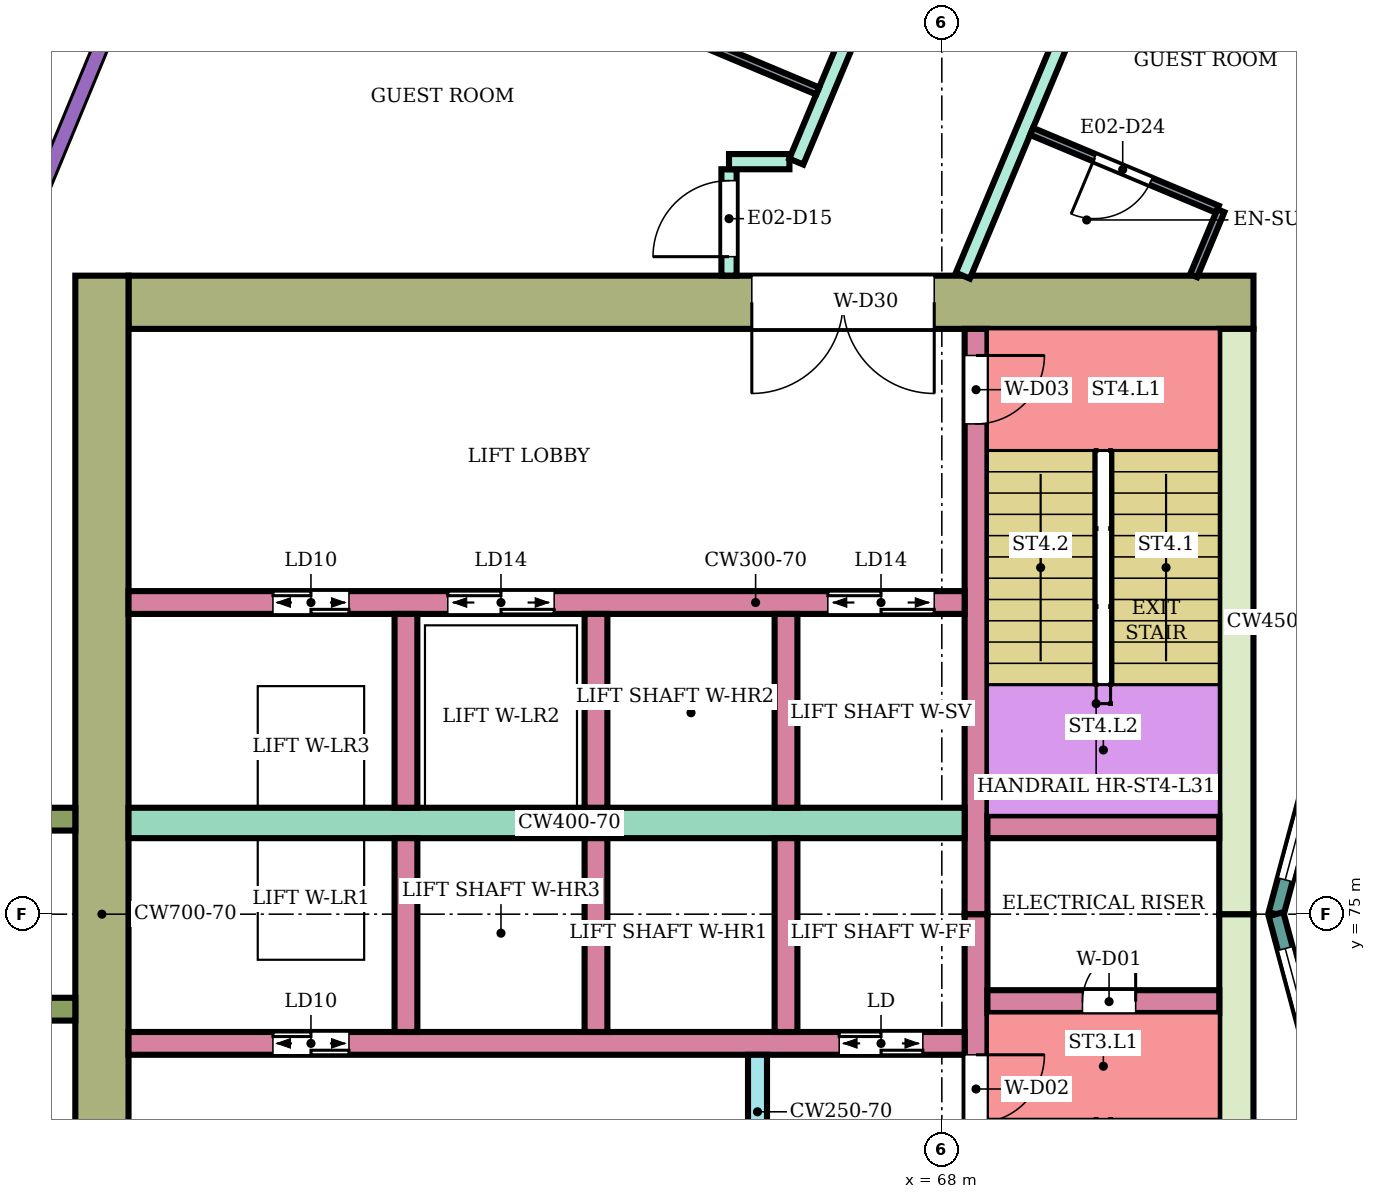
"""IFC4 building model, lengths in metres.
Left out: names, types, materials, properties, quantities, classifications, styles, units other than length and angle.
Written with IfcOpenShell. Run it as: python <this file> out.ifc"""

import sys

from ifc_helpers import new_model, si_unit, direction, frame, frame_2d, origin, place, context, subcontext, project, spatial, rectangle, extrude, element, fill, save


model = new_model("IFC4")
c1 = context("Model", 3, precision=1e-05, world=origin(), true_north=direction((0.0, 1.0)))
c2 = subcontext(c1, "Body", "Model", "MODEL_VIEW")
j1 = project(units=[si_unit("LENGTHUNIT", "METRE"), si_unit("PLANEANGLEUNIT", "RADIAN")], contexts=[c1])
p1 = place(None, origin())
s1 = spatial("IfcSite", under=j1, at=p1, CompositionType="ELEMENT")
p2 = place(p1, origin())
s2 = spatial("IfcBuilding", under=s1, at=p2, CompositionType="ELEMENT")
p3 = place(p2, frame((0.0, 0.0, 134.1)))
s3 = spatial("IfcBuildingStorey", under=s2, at=p3, CompositionType="ELEMENT", Elevation=134.1)
p4 = place(p3, frame((72.1, 83.05, 0.0), z_axis=(0.0, 0.0, 1.0), x_axis=(-1.0, 0.0, 0.0)))
e1 = element("IfcWall", 1, at=p4, inside=s3, PredefinedType="SHEAR", context=c2, shape_type="SweptSolid", body=[
    extrude(rectangle(XDim=14.8, YDim=0.7, at=frame_2d((7.4, 0.0))), origin(), (0.0, 0.0, 1.0), 3.58),
])
p5 = place(p4, frame((4.2, 0.0, 0.0)))
e2 = element("IfcOpeningElement", 2, at=p5, cuts=e1, PredefinedType="OPENING", context=c2, shape_type="SweptSolid", body=[
    extrude(rectangle(XDim=2.4, YDim=2.4, at=frame_2d((1.2, 1.2))), frame((0.0, 0.36, 0.0), z_axis=(0.0, -1.0, 0.0), x_axis=(1.0, 0.0, 0.0)), (0.0, 0.0, 1.0), 0.72),
])
for number, where, z_axis, x_axis in (
    (3, (71.875, 75.0, 0.0), (0.0, 0.0, 1.0), (0.0, -1.0, 0.0)),
    (4, (71.875, 82.7, 0.0), (0.0, 0.0, 1.0), (0.0, -1.0, 0.0)),
):
    element("IfcWall", number, at=place(p3, frame(where, z_axis=z_axis, x_axis=x_axis)), inside=s3, PredefinedType="SHEAR", context=c2, shape_type="SweptSolid", body=[
        extrude(rectangle(XDim=7.7, YDim=0.45, at=frame_2d((3.85, 0.0))), origin(), (0.0, 0.0, 1.0), 3.58),
    ])
p6 = place(p3, frame((56.95, 83.4, 0.0), z_axis=(0.0, 0.0, 1.0), x_axis=(0.0, -1.0, 0.0)))
e5 = element("IfcWall", 5, at=p6, inside=s3, PredefinedType="SHEAR", context=c2, shape_type="SweptSolid", body=[
    extrude(rectangle(XDim=16.8, YDim=0.7, at=frame_2d((8.4, 0.0))), origin(), (0.0, 0.0, 1.0), 3.58),
])
p7 = place(p3, frame((68.45, 75.0, 0.0), z_axis=(0.0, 0.0, 1.0), x_axis=(0.0, -1.0, 0.0)))
e6 = element("IfcWall", 6, at=p7, inside=s3, PredefinedType="SHEAR", context=c2, shape_type="SweptSolid", body=[
    extrude(rectangle(XDim=7.7, YDim=0.3, at=frame_2d((3.85, 0.0))), origin(), (0.0, 0.0, 1.0), 3.58),
])
p8 = place(p7, frame((1.85, 0.0, 0.0)))
e7 = element("IfcOpeningElement", 7, at=p8, cuts=e6, PredefinedType="OPENING", context=c2, shape_type="SweptSolid", body=[
    extrude(rectangle(XDim=0.9, YDim=2.1, at=frame_2d((0.45, 1.05))), frame((0.0, 0.16, 0.0), z_axis=(0.0, -1.0, 0.0), x_axis=(1.0, 0.0, 0.0)), (0.0, 0.0, 1.0), 0.32),
])
p9 = place(p3, frame((68.45, 82.7, 0.0), z_axis=(0.0, 0.0, 1.0), x_axis=(0.0, -1.0, 0.0)))
e8 = element("IfcWall", 8, at=p9, inside=s3, PredefinedType="SHEAR", context=c2, shape_type="SweptSolid", body=[
    extrude(rectangle(XDim=7.7, YDim=0.3, at=frame_2d((3.85, 0.0))), origin(), (0.0, 0.0, 1.0), 3.58),
])
p10 = place(p9, frame((0.35, 0.0, 0.0)))
e9 = element("IfcOpeningElement", 9, at=p10, cuts=e8, PredefinedType="OPENING", context=c2, shape_type="SweptSolid", body=[
    extrude(rectangle(XDim=0.9, YDim=2.1, at=frame_2d((0.45, 1.05))), frame((0.0, 0.16, 0.0), z_axis=(0.0, -1.0, 0.0), x_axis=(1.0, 0.0, 0.0)), (0.0, 0.0, 1.0), 0.32),
])
p11 = place(p3, frame((71.65, 73.85, 0.0), z_axis=(0.0, 0.0, 1.0), x_axis=(-1.0, 0.0, 0.0)))
e10 = element("IfcWall", 10, at=p11, inside=s3, PredefinedType="SHEAR", context=c2, shape_type="SweptSolid", body=[
    extrude(rectangle(XDim=3.05, YDim=0.3, at=frame_2d((1.525, 0.0))), origin(), (0.0, 0.0, 1.0), 3.58),
])
p12 = place(p11, frame((1.1, 0.0, 0.0)))
e11 = element("IfcOpeningElement", 11, at=p12, cuts=e10, PredefinedType="OPENING", context=c2, shape_type="SweptSolid", body=[
    extrude(rectangle(XDim=0.7, YDim=2.0, at=frame_2d((0.35, 1.0))), frame((0.0, 0.16, 0.0), z_axis=(0.0, -1.0, 0.0), x_axis=(1.0, 0.0, 0.0)), (0.0, 0.0, 1.0), 0.32),
])
p13 = place(p3, frame((71.65, 76.15, 0.0), z_axis=(0.0, 0.0, 1.0), x_axis=(-1.0, 0.0, 0.0)))
e12 = element("IfcWall", 12, at=p13, inside=s3, PredefinedType="SHEAR", context=c2, shape_type="SweptSolid", body=[
    extrude(rectangle(XDim=3.05, YDim=0.3, at=frame_2d((1.525, 0.0))), origin(), (0.0, 0.0, 1.0), 3.58),
])
p14 = place(p3, frame((68.3, 73.3, 0.0), z_axis=(0.0, 0.0, 1.0), x_axis=(-1.0, 0.0, 0.0)))
e13 = element("IfcWall", 13, at=p14, inside=s3, PredefinedType="SHEAR", context=c2, shape_type="SweptSolid", body=[
    extrude(rectangle(XDim=11.0, YDim=0.3, at=frame_2d((5.5, 0.0))), origin(), (0.0, 0.0, 1.0), 3.58),
])
p15 = place(p14, frame((0.55, 0.0, 0.0)))
e14 = element("IfcOpeningElement", 14, at=p15, cuts=e13, PredefinedType="OPENING", context=c2, shape_type="SweptSolid", body=[
    extrude(rectangle(XDim=1.1, YDim=2.1, at=frame_2d((0.55, 1.05))), frame((0.0, 0.16, 0.0), z_axis=(0.0, -1.0, 0.0), x_axis=(1.0, 0.0, 0.0)), (0.0, 0.0, 1.0), 0.32),
])
p16 = place(p14, frame((8.1, 0.0, 0.0)))
e15 = element("IfcOpeningElement", 15, at=p16, cuts=e13, PredefinedType="OPENING", context=c2, shape_type="SweptSolid", body=[
    extrude(rectangle(XDim=1.0, YDim=2.1, at=frame_2d((0.5, 1.05))), frame((0.0, 0.16, 0.0), z_axis=(0.0, -1.0, 0.0), x_axis=(1.0, 0.0, 0.0)), (0.0, 0.0, 1.0), 0.32),
])
p17 = place(p3, frame((68.3, 76.2, 0.0), z_axis=(0.0, 0.0, 1.0), x_axis=(-1.0, 0.0, 0.0)))
e16 = element("IfcWall", 16, at=p17, inside=s3, PredefinedType="SHEAR", context=c2, shape_type="SweptSolid", body=[
    extrude(rectangle(XDim=11.0, YDim=0.4, at=frame_2d((5.5, 0.0))), origin(), (0.0, 0.0, 1.0), 3.58),
])
p18 = place(p3, frame((68.3, 79.1, 0.0), z_axis=(0.0, 0.0, 1.0), x_axis=(-1.0, 0.0, 0.0)))
e17 = element("IfcWall", 17, at=p18, inside=s3, PredefinedType="SHEAR", context=c2, shape_type="SweptSolid", body=[
    extrude(rectangle(XDim=11.0, YDim=0.3, at=frame_2d((5.5, 0.0))), origin(), (0.0, 0.0, 1.0), 3.58),
])
p19 = place(p18, frame((0.4, 0.0, 0.0)))
e18 = element("IfcOpeningElement", 18, at=p19, cuts=e17, PredefinedType="OPENING", context=c2, shape_type="SweptSolid", body=[
    extrude(rectangle(XDim=1.4, YDim=2.1, at=frame_2d((0.7, 1.05))), frame((0.0, 0.16, 0.0), z_axis=(0.0, -1.0, 0.0), x_axis=(1.0, 0.0, 0.0)), (0.0, 0.0, 1.0), 0.32),
])
p20 = place(p18, frame((5.4, 0.0, 0.0)))
e19 = element("IfcOpeningElement", 19, at=p20, cuts=e17, PredefinedType="OPENING", context=c2, shape_type="SweptSolid", body=[
    extrude(rectangle(XDim=1.4, YDim=2.1, at=frame_2d((0.7, 1.05))), frame((0.0, 0.16, 0.0), z_axis=(0.0, -1.0, 0.0), x_axis=(1.0, 0.0, 0.0)), (0.0, 0.0, 1.0), 0.32),
])
p21 = place(p18, frame((8.1, 0.0, 0.0)))
e20 = element("IfcOpeningElement", 20, at=p21, cuts=e17, PredefinedType="OPENING", context=c2, shape_type="SweptSolid", body=[
    extrude(rectangle(XDim=1.0, YDim=2.1, at=frame_2d((0.5, 1.05))), frame((0.0, 0.16, 0.0), z_axis=(0.0, -1.0, 0.0), x_axis=(1.0, 0.0, 0.0)), (0.0, 0.0, 1.0), 0.32),
])
for number, where, z_axis, x_axis in (
    (21, (65.95, 76.0, 0.0), (0.0, 0.0, 1.0), (0.0, -1.0, 0.0)),
    (22, (63.45, 76.0, 0.0), (0.0, 0.0, 1.0), (0.0, -1.0, 0.0)),
    (23, (60.95, 76.0, 0.0), (0.0, 0.0, 1.0), (0.0, -1.0, 0.0)),
    (24, (65.95, 78.95, 0.0), (0.0, 0.0, 1.0), (0.0, -1.0, 0.0)),
    (25, (63.45, 78.95, 0.0), (0.0, 0.0, 1.0), (0.0, -1.0, 0.0)),
    (26, (60.95, 78.95, 0.0), (0.0, 0.0, 1.0), (0.0, -1.0, 0.0)),
):
    element("IfcWall", number, at=place(p3, frame(where, z_axis=z_axis, x_axis=x_axis)), inside=s3, PredefinedType="SHEAR", context=c2, shape_type="SweptSolid", body=[
        extrude(rectangle(XDim=2.55, YDim=0.3, at=frame_2d((1.275, 0.0))), origin(), (0.0, 0.0, 1.0), 3.58),
    ])
p22 = place(p3, frame((65.575, 73.15, 0.0), z_axis=(0.0, 0.0, 1.0), x_axis=(0.0, -1.0, 0.0)))
e27 = element("IfcWall", 27, at=p22, inside=s3, PredefinedType="SHEAR", context=c2, shape_type="SweptSolid", body=[
    extrude(rectangle(XDim=1.5, YDim=0.25, at=frame_2d((0.75, 0.0))), origin(), (0.0, 0.0, 1.0), 3.58),
])
for number, where, z_axis, x_axis in (
    (28, (56.6, 76.25, 0.0), (0.0, 0.0, 1.0), (-1.0, 0.0, 0.0)),
    (29, (56.6, 73.75, 0.0), (0.0, 0.0, 1.0), (-1.0, 0.0, 0.0)),
):
    element("IfcWall", number, at=place(p3, frame(where, z_axis=z_axis, x_axis=x_axis)), inside=s3, PredefinedType="NOTDEFINED", context=c2, shape_type="SweptSolid", body=[
        extrude(rectangle(XDim=2.416, YDim=0.3, at=frame_2d((1.208, 0.0))), origin(), (0.0, 0.0, 1.0), 3.9),
    ])
p23 = place(p3, frame((73.415, 78.802, 0.0), z_axis=(0.0, 0.0, 1.0), x_axis=(-0.258789828301, -0.965933654434, 0.0)))
e30 = element("IfcWall", 30, at=p23, inside=s3, PredefinedType="NOTDEFINED", context=c2, shape_type="SweptSolid", body=[
    extrude(rectangle(XDim=3.936, YDim=0.2, at=frame_2d((1.968, 0.0))), origin(), (0.0, 0.0, 1.0), 3.9),
])
p24 = place(p23, frame((0.468, 0.0, 0.9)))
e31 = element("IfcOpeningElement", 31, at=p24, cuts=e30, PredefinedType="OPENING", context=c2, shape_type="SweptSolid", body=[
    extrude(rectangle(XDim=3.0, YDim=2.3, at=frame_2d((1.5, 1.15))), frame((0.0, 0.11, 0.0), z_axis=(0.0, -1.0, 0.0), x_axis=(1.0, 0.0, 0.0)), (0.0, 0.0, 1.0), 0.22),
])
p25 = place(p3, frame((72.396, 75.0, 0.0), z_axis=(0.0, 0.0, 1.0), x_axis=(0.258789828301, -0.965933654434, 0.0)))
e32 = element("IfcWall", 32, at=p25, inside=s3, PredefinedType="NOTDEFINED", context=c2, shape_type="SweptSolid", body=[
    extrude(rectangle(XDim=3.936, YDim=0.2, at=frame_2d((1.968, 0.0))), origin(), (0.0, 0.0, 1.0), 3.9),
])
p26 = place(p25, frame((0.468, 0.0, 0.9)))
e33 = element("IfcOpeningElement", 33, at=p26, cuts=e32, PredefinedType="OPENING", context=c2, shape_type="SweptSolid", body=[
    extrude(rectangle(XDim=3.0, YDim=2.3, at=frame_2d((1.5, 1.15))), frame((0.0, 0.11, 0.0), z_axis=(0.0, -1.0, 0.0), x_axis=(1.0, 0.0, 0.0)), (0.0, 0.0, 1.0), 0.22),
])
p27 = place(p3, frame((65.2, 83.401, 0.0), z_axis=(0.0, 0.0, 1.0), x_axis=(0.0, 1.0, 0.0)))
e34 = element("IfcWall", 34, at=p27, inside=s3, PredefinedType="PARTITIONING", context=c2, shape_type="SweptSolid", body=[
    extrude(rectangle(XDim=1.399, YDim=0.2, at=frame_2d((0.7, 0.0))), origin(), (0.0, 0.0, 1.0), 3.45),
])
p28 = place(p27, frame((0.249, 0.0, 0.0)))
e35 = element("IfcOpeningElement", 35, at=p28, cuts=e34, PredefinedType="OPENING", context=c2, shape_type="SweptSolid", body=[
    extrude(rectangle(XDim=1.0, YDim=2.1, at=frame_2d((0.5, 1.05))), frame((0.0, 0.11, 0.0), z_axis=(0.0, -1.0, 0.0), x_axis=(1.0, 0.0, 0.0)), (0.0, 0.0, 1.0), 0.22),
])
p29 = place(p3, frame((65.2, 84.9, 0.0), z_axis=(0.0, 0.0, 1.0), x_axis=(1.0, 0.0, 0.0)))
e36 = element("IfcWall", 36, at=p29, inside=s3, PredefinedType="PARTITIONING", context=c2, shape_type="SweptSolid", body=[
    extrude(rectangle(XDim=0.795, YDim=0.2, at=frame_2d((0.397, 0.0))), origin(), (0.0, 0.0, 1.0), 3.45),
])
p30 = place(p3, frame((66.085, 84.9, 0.0), z_axis=(0.0, 0.0, 1.0), x_axis=(0.386617151403, 0.922240303956, 0.0)))
e37 = element("IfcWall", 37, at=p30, inside=s3, PredefinedType="PARTITIONING", context=c2, shape_type="SweptSolid", body=[
    extrude(rectangle(XDim=8.5, YDim=0.2, at=frame_2d((4.25, 0.0))), origin(), (0.0, 0.0, 1.0), 3.45),
])
p31 = place(p30, frame((3.748, 0.0, 0.0)))
e38 = element("IfcOpeningElement", 38, at=p31, cuts=e37, PredefinedType="OPENING", context=c2, shape_type="SweptSolid", body=[
    extrude(rectangle(XDim=1.0, YDim=2.1, at=frame_2d((0.5, 1.05))), frame((0.0, 0.11, 0.0), z_axis=(0.0, -1.0, 0.0), x_axis=(1.0, 0.0, 0.0)), (0.0, 0.0, 1.0), 0.22),
])
p32 = place(p3, frame((68.277, 83.4, 0.0), z_axis=(0.0, 0.0, 1.0), x_axis=(0.386454861164, 0.922308321703, 0.0)))
e39 = element("IfcWall", 39, at=p32, inside=s3, PredefinedType="PARTITIONING", context=c2, shape_type="SweptSolid", body=[
    extrude(rectangle(XDim=7.762, YDim=0.2, at=frame_2d((3.881, 0.0))), origin(), (0.0, 0.0, 1.0), 3.45),
])
p33 = place(p32, frame((5.351, 0.0, 0.0)))
e40 = element("IfcOpeningElement", 40, at=p33, cuts=e39, PredefinedType="OPENING", context=c2, shape_type="SweptSolid", body=[
    extrude(rectangle(XDim=1.0, YDim=2.1, at=frame_2d((0.5, 1.05))), frame((0.0, 0.11, 0.0), z_axis=(0.0, -1.0, 0.0), x_axis=(1.0, 0.0, 0.0)), (0.0, 0.0, 1.0), 0.22),
])
p34 = place(p3, frame((71.263, 90.135, 0.0), z_axis=(0.0, 0.0, 1.0), x_axis=(0.499869438034, -0.86610077065, 0.0)))
e41 = element("IfcWall", 41, at=p34, inside=s3, PredefinedType="PARTITIONING", context=c2, shape_type="SweptSolid", body=[
    extrude(rectangle(XDim=9.777, YDim=0.2, at=frame_2d((4.889, 0.0))), origin(), (0.0, 0.0, 1.0), 3.45),
])
p35 = place(p3, frame((63.877, 86.874, 0.0), z_axis=(0.0, 0.0, 1.0), x_axis=(0.92214860299, -0.386835823062, 0.0)))
e42 = element("IfcWall", 42, at=p35, inside=s3, PredefinedType="PARTITIONING", context=c2, shape_type="SweptSolid", body=[
    extrude(rectangle(XDim=2.7, YDim=0.1, at=frame_2d((1.35, 0.0))), origin(), (0.0, 0.0, 1.0), 3.45),
])
p36 = place(p3, frame((69.181, 85.298, 0.0), z_axis=(0.0, 0.0, 1.0), x_axis=(0.922377635784, -0.38628939541, 0.0)))
e43 = element("IfcWall", 43, at=p36, inside=s3, PredefinedType="PARTITIONING", context=c2, shape_type="SweptSolid", body=[
    extrude(rectangle(XDim=2.65, YDim=0.1, at=frame_2d((1.325, 0.0))), origin(), (0.0, 0.0, 1.0), 3.45),
])
p37 = place(p36, frame((0.9, 0.0, 0.0)))
e44 = element("IfcOpeningElement", 44, at=p37, cuts=e43, PredefinedType="OPENING", context=c2, shape_type="SweptSolid", body=[
    extrude(rectangle(XDim=0.8, YDim=2.1, at=frame_2d((0.4, 1.05))), frame((0.0, 0.06, 0.0), z_axis=(0.0, -1.0, 0.0), x_axis=(1.0, 0.0, 0.0)), (0.0, 0.0, 1.0), 0.12),
])
p38 = place(p3, frame((71.313, 83.4, 0.0), z_axis=(0.0, 0.0, 1.0), x_axis=(0.386148512695, 0.922436624459, 0.0)))
e45 = element("IfcWall", 45, at=p38, inside=s3, PredefinedType="PARTITIONING", context=c2, shape_type="SweptSolid", body=[
    extrude(rectangle(XDim=0.927, YDim=0.1, at=frame_2d((0.463, 0.0))), origin(), (0.0, 0.0, 1.0), 3.45),
])
p39 = place(p24, origin())
e46 = element("IfcWindow", 46, at=p39, inside=s3, PartitioningType="SINGLE_PANEL", PredefinedType="WINDOW", context=c2, shape_type="SweptSolid", body=[
    extrude(rectangle(XDim=3.0, YDim=2.3, at=frame_2d((1.5, 1.15))), frame((0.0, 0.03, 0.0), z_axis=(0.0, -1.0, 0.0), x_axis=(1.0, 0.0, 0.0)), (0.0, 0.0, 1.0), 0.06),
])
fill(e31, e46)
p40 = place(p26, origin())
e47 = element("IfcWindow", 47, at=p40, inside=s3, PartitioningType="SINGLE_PANEL", PredefinedType="WINDOW", context=c2, shape_type="SweptSolid", body=[
    extrude(rectangle(XDim=3.0, YDim=2.3, at=frame_2d((1.5, 1.15))), frame((0.0, 0.03, 0.0), z_axis=(0.0, -1.0, 0.0), x_axis=(1.0, 0.0, 0.0)), (0.0, 0.0, 1.0), 0.06),
])
fill(e33, e47)
p41 = place(p28, origin())
e48 = element("IfcDoor", 48, at=p41, inside=s3, OperationType="SINGLE_SWING_LEFT", PredefinedType="DOOR", context=c2, shape_type="SweptSolid", body=[
    extrude(rectangle(XDim=1.0, YDim=2.1, at=frame_2d((0.5, 1.05))), frame((0.0, 0.025, 0.0), z_axis=(0.0, -1.0, 0.0), x_axis=(1.0, 0.0, 0.0)), (0.0, 0.0, 1.0), 0.05),
])
fill(e35, e48)
p42 = place(p37, frame((0.8, 0.0, 0.0), z_axis=(0.0, 0.0, 1.0), x_axis=(-1.0, 0.0, 0.0)))
e49 = element("IfcDoor", 49, at=p42, inside=s3, OperationType="SINGLE_SWING_RIGHT", PredefinedType="DOOR", context=c2, shape_type="SweptSolid", body=[
    extrude(rectangle(XDim=0.8, YDim=2.1, at=frame_2d((0.4, 1.05))), frame((0.0, 0.025, 0.0), z_axis=(0.0, -1.0, 0.0), x_axis=(1.0, 0.0, 0.0)), (0.0, 0.0, 1.0), 0.05),
])
fill(e44, e49)
p43 = place(p12, frame((0.7, 0.0, 0.0), z_axis=(0.0, 0.0, 1.0), x_axis=(-1.0, 0.0, 0.0)))
e50 = element("IfcDoor", 50, at=p43, inside=s3, OperationType="SINGLE_SWING_RIGHT", PredefinedType="DOOR", context=c2, shape_type="SweptSolid", body=[
    extrude(rectangle(XDim=0.7, YDim=2.0, at=frame_2d((0.35, 1.0))), frame((0.0, 0.025, 0.0), z_axis=(0.0, -1.0, 0.0), x_axis=(1.0, 0.0, 0.0)), (0.0, 0.0, 1.0), 0.05),
])
fill(e11, e50)
p44 = place(p8, origin())
e51 = element("IfcDoor", 51, at=p44, inside=s3, OperationType="SINGLE_SWING_LEFT", PredefinedType="DOOR", context=c2, shape_type="SweptSolid", body=[
    extrude(rectangle(XDim=0.9, YDim=2.1, at=frame_2d((0.45, 1.05))), frame((0.0, 0.025, 0.0), z_axis=(0.0, -1.0, 0.0), x_axis=(1.0, 0.0, 0.0)), (0.0, 0.0, 1.0), 0.05),
])
fill(e7, e51)
p45 = place(p10, origin())
e52 = element("IfcDoor", 52, at=p45, inside=s3, OperationType="SINGLE_SWING_LEFT", PredefinedType="DOOR", context=c2, shape_type="SweptSolid", body=[
    extrude(rectangle(XDim=0.9, YDim=2.1, at=frame_2d((0.45, 1.05))), frame((0.0, 0.025, 0.0), z_axis=(0.0, -1.0, 0.0), x_axis=(1.0, 0.0, 0.0)), (0.0, 0.0, 1.0), 0.05),
])
fill(e9, e52)
p46 = place(p15, origin())
e53 = element("IfcDoor", 53, at=p46, inside=s3, OperationType="DOUBLE_DOOR_SLIDING", PredefinedType="DOOR", context=c2, shape_type="SweptSolid", body=[
    extrude(rectangle(XDim=1.1, YDim=2.1, at=frame_2d((0.55, 1.05))), frame((0.0, 0.025, 0.0), z_axis=(0.0, -1.0, 0.0), x_axis=(1.0, 0.0, 0.0)), (0.0, 0.0, 1.0), 0.05),
])
fill(e14, e53)
p47 = place(p16, origin())
e54 = element("IfcDoor", 54, at=p47, inside=s3, OperationType="DOUBLE_DOOR_SLIDING", PredefinedType="DOOR", context=c2, shape_type="SweptSolid", body=[
    extrude(rectangle(XDim=1.0, YDim=2.1, at=frame_2d((0.5, 1.05))), frame((0.0, 0.025, 0.0), z_axis=(0.0, -1.0, 0.0), x_axis=(1.0, 0.0, 0.0)), (0.0, 0.0, 1.0), 0.05),
])
fill(e15, e54)
p48 = place(p19, origin())
e55 = element("IfcDoor", 55, at=p48, inside=s3, OperationType="DOUBLE_DOOR_SLIDING", PredefinedType="DOOR", context=c2, shape_type="SweptSolid", body=[
    extrude(rectangle(XDim=1.4, YDim=2.1, at=frame_2d((0.7, 1.05))), frame((0.0, 0.025, 0.0), z_axis=(0.0, -1.0, 0.0), x_axis=(1.0, 0.0, 0.0)), (0.0, 0.0, 1.0), 0.05),
])
fill(e18, e55)
p49 = place(p20, origin())
e56 = element("IfcDoor", 56, at=p49, inside=s3, OperationType="DOUBLE_DOOR_SLIDING", PredefinedType="DOOR", context=c2, shape_type="SweptSolid", body=[
    extrude(rectangle(XDim=1.4, YDim=2.1, at=frame_2d((0.7, 1.05))), frame((0.0, 0.025, 0.0), z_axis=(0.0, -1.0, 0.0), x_axis=(1.0, 0.0, 0.0)), (0.0, 0.0, 1.0), 0.05),
])
fill(e19, e56)
p50 = place(p21, origin())
e57 = element("IfcDoor", 57, at=p50, inside=s3, OperationType="DOUBLE_DOOR_SLIDING", PredefinedType="DOOR", context=c2, shape_type="SweptSolid", body=[
    extrude(rectangle(XDim=1.0, YDim=2.1, at=frame_2d((0.5, 1.05))), frame((0.0, 0.025, 0.0), z_axis=(0.0, -1.0, 0.0), x_axis=(1.0, 0.0, 0.0)), (0.0, 0.0, 1.0), 0.05),
])
fill(e20, e57)
p51 = place(p5, origin())
e58 = element("IfcDoor", 58, at=p51, inside=s3, OperationType="DOUBLE_DOOR_SINGLE_SWING", PredefinedType="DOOR", context=c2, shape_type="SweptSolid", body=[
    extrude(rectangle(XDim=2.4, YDim=2.4, at=frame_2d((1.2, 1.2))), frame((0.0, 0.025, 0.0), z_axis=(0.0, -1.0, 0.0), x_axis=(1.0, 0.0, 0.0)), (0.0, 0.0, 1.0), 0.05),
])
fill(e2, e58)
save(model, sys.argv[1])
